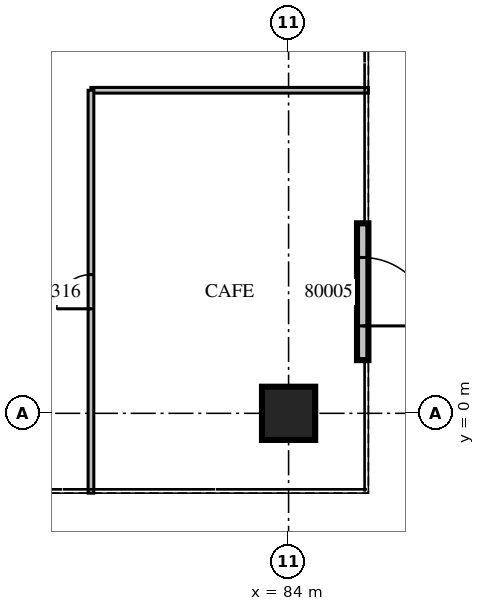
"""IFC4 building model, lengths in metres.
Left out: names, types, materials, properties, quantities, classifications, styles, units other than length and angle.
Written with IfcOpenShell. Run it as: python <this file> out.ifc"""

import sys

from ifc_helpers import new_model, si_unit, direction, frame, frame_2d, origin, origin_2d, place, context, subcontext, project, spatial, rectangle, extrude, source, transform, mapped, element, fill, save


model = new_model("IFC4")
c1 = context("Model", 3, precision=1e-05, world=origin(), true_north=direction((0.0, 1.0)))
c2 = subcontext(c1, "Body", "Model", "MODEL_VIEW")
j1 = project(units=[si_unit("LENGTHUNIT", "METRE"), si_unit("PLANEANGLEUNIT", "RADIAN")], contexts=[c1])
p1 = place(None, origin())
s1 = spatial("IfcSite", under=j1, at=p1, CompositionType="ELEMENT")
p2 = place(p1, origin())
s2 = spatial("IfcBuilding", under=s1, at=p2, CompositionType="ELEMENT")
p3 = place(p2, origin())
s3 = spatial("IfcBuildingStorey", under=s2, at=p3, CompositionType="ELEMENT", Elevation=0.0)
m1 = source(origin(), c2, "Body", "SweptSolid", [
    extrude(rectangle(XDim=1.4, YDim=1.4, at=origin_2d()), origin(), (0.0, 0.0, 1.0), 7.5),
])
p4 = place(p3, frame((84.0, 0.0, 0.0), z_axis=(0.0, 0.0, 1.0), x_axis=(1.0, 0.0, 0.0)))
e1 = element("IfcColumn", 1, at=p4, inside=s3, PredefinedType="COLUMN", context=c2, shape_type="MappedRepresentation", body=[
    mapped(m1, transform((0.0, 0.0, 0.0), scale=1.0)),
])
m2 = source(origin(), c2, "Body", "SweptSolid", [
    extrude(rectangle(XDim=3.6, YDim=0.3, at=frame_2d((1.8, 0.0))), origin(), (0.0, 0.0, 1.0), 6.9),
])
p5 = place(p3, frame((85.95, 1.4, 0.0), z_axis=(0.0, 0.0, 1.0), x_axis=(0.0, 1.0, 0.0)))
e2 = element("IfcWall", 2, at=p5, inside=s3, PredefinedType="STANDARD", context=c2, shape_type="MappedRepresentation", body=[
    mapped(m2, transform((0.0, 0.0, 0.0), scale=1.0)),
])
m3 = source(origin(), c2, "Body", "SweptSolid", [
    extrude(rectangle(XDim=1.8, YDim=2.4, at=frame_2d((0.9, 1.2))), frame((0.0, 0.16, 0.0), z_axis=(0.0, -1.0, 0.0), x_axis=(1.0, 0.0, 0.0)), (0.0, 0.0, 1.0), 0.32),
])
p6 = place(p5, frame((0.9, 0.0, 0.0)))
e3 = element("IfcOpeningElement", 3, at=p6, cuts=e2, PredefinedType="OPENING", context=c2, shape_type="MappedRepresentation", body=[
    mapped(m3, transform((0.0, 0.0, 0.0), scale=1.0)),
])
p7 = place(p3, frame((78.8, 8.5, 0.0), z_axis=(0.0, 0.0, 1.0), x_axis=(1.0, 0.0, 0.0)))
e4 = element("IfcWall", 4, at=p7, inside=s3, PredefinedType="PARTITIONING", context=c2, shape_type="SweptSolid", body=[
    extrude(rectangle(XDim=7.3, YDim=0.15, at=frame_2d((3.65, 0.0))), origin(), (0.0, 0.0, 1.0), 6.9),
])
m4 = source(origin(), c2, "Body", "SweptSolid", [
    extrude(rectangle(XDim=10.6, YDim=0.15, at=frame_2d((5.3, 0.0))), origin(), (0.0, 0.0, 1.0), 6.9),
])
p8 = place(p3, frame((78.8, -2.1, 0.0), z_axis=(0.0, 0.0, 1.0), x_axis=(0.0, 1.0, 0.0)))
e5 = element("IfcWall", 5, at=p8, inside=s3, PredefinedType="PARTITIONING", context=c2, shape_type="MappedRepresentation", body=[
    mapped(m4, transform((0.0, 0.0, 0.0), scale=1.0)),
])
m5 = source(origin(), c2, "Body", "SweptSolid", [
    extrude(rectangle(XDim=0.9, YDim=2.1, at=frame_2d((0.45, 1.05))), frame((0.0, 0.085, 0.0), z_axis=(0.0, -1.0, 0.0), x_axis=(1.0, 0.0, 0.0)), (0.0, 0.0, 1.0), 0.17),
])
p9 = place(p8, frame((4.85, 0.0, 0.0)))
e6 = element("IfcOpeningElement", 6, at=p9, cuts=e5, PredefinedType="OPENING", context=c2, shape_type="MappedRepresentation", body=[
    mapped(m5, transform((0.0, 0.0, 0.0), scale=1.0)),
])
m6 = source(origin(), c2, "Body", "SweptSolid", [
    extrude(rectangle(XDim=1.8, YDim=2.4, at=frame_2d((0.9, 1.2))), frame((0.0, 0.025, 0.0), z_axis=(0.0, -1.0, 0.0), x_axis=(1.0, 0.0, 0.0)), (0.0, 0.0, 1.0), 0.05),
])
p10 = place(p6, origin())
e7 = element("IfcDoor", 7, at=p10, inside=s3, OperationType="DOUBLE_DOOR_SINGLE_SWING", PredefinedType="DOOR", context=c2, shape_type="MappedRepresentation", body=[
    mapped(m6, transform((0.0, 0.0, 0.0), scale=1.0)),
])
fill(e3, e7)
m7 = source(origin(), c2, "Body", "SweptSolid", [
    extrude(rectangle(XDim=0.9, YDim=2.1, at=frame_2d((0.45, 1.05))), frame((0.0, 0.025, 0.0), z_axis=(0.0, -1.0, 0.0), x_axis=(1.0, 0.0, 0.0)), (0.0, 0.0, 1.0), 0.05),
])
p11 = place(p9, origin())
e8 = element("IfcDoor", 8, at=p11, inside=s3, OperationType="SINGLE_SWING_LEFT", PredefinedType="DOOR", context=c2, shape_type="MappedRepresentation", body=[
    mapped(m7, transform((0.0, 0.0, 0.0), scale=1.0)),
])
fill(e6, e8)
save(model, sys.argv[1])
